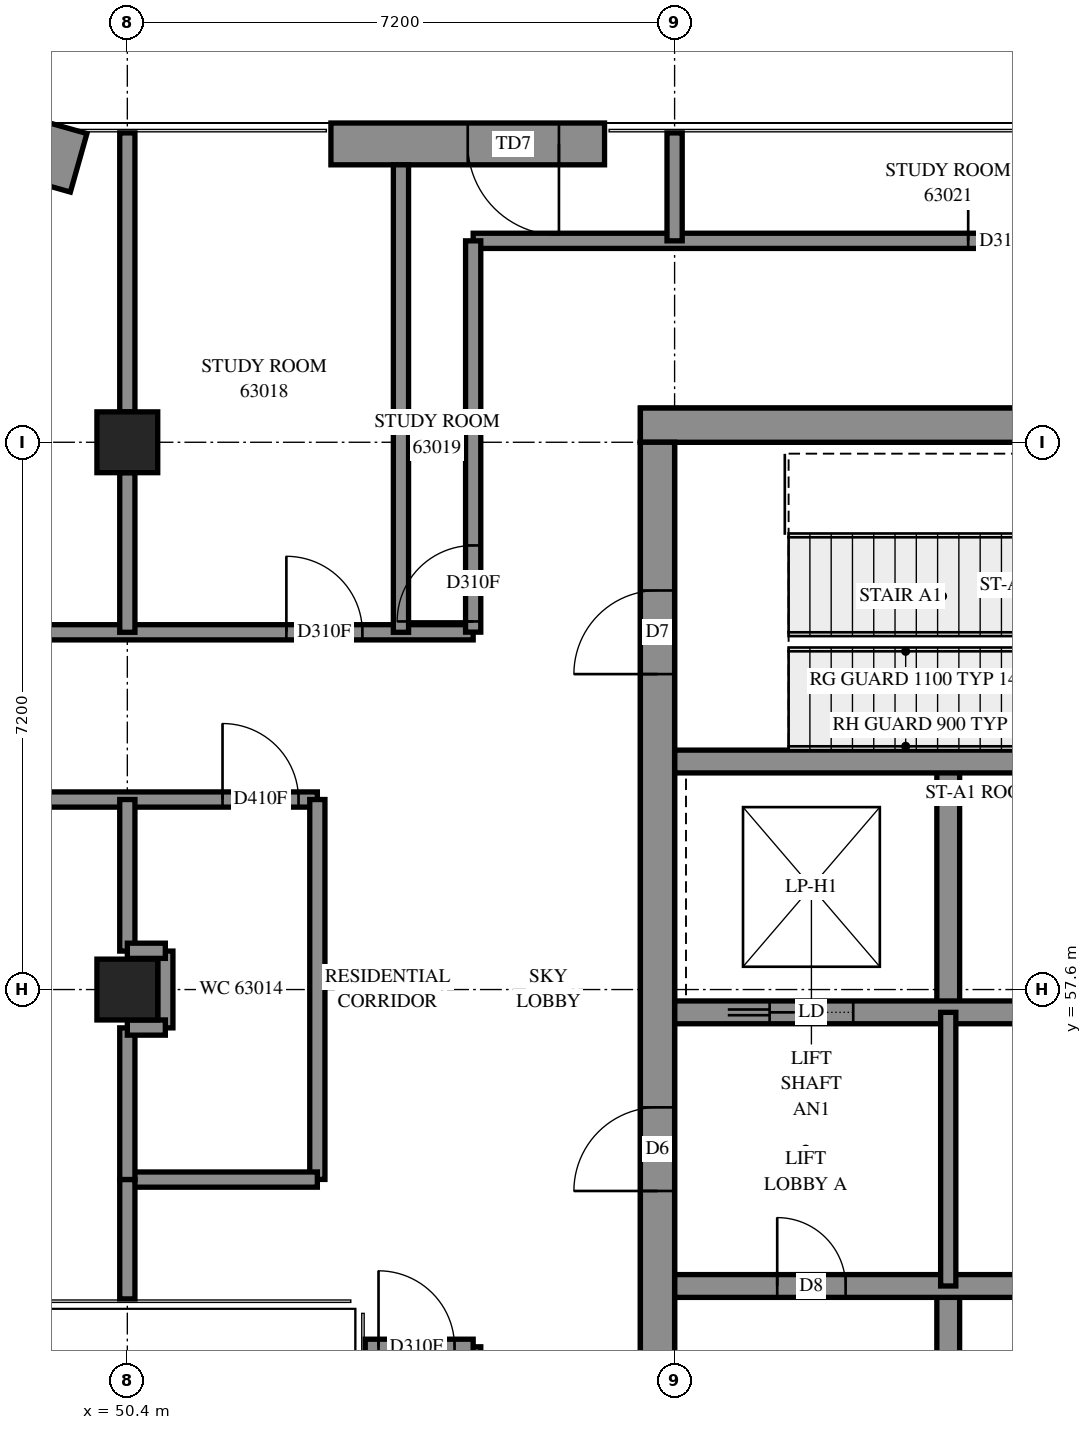
"""IFC4 building model, lengths in metres.
Left out: names, types, materials, properties, quantities, classifications, styles, units other than length and angle.
Written with IfcOpenShell. Run it as: python <this file> out.ifc"""

import sys

from ifc_helpers import new_model, si_unit, direction, frame, frame_2d, origin, origin_2d, place, context, subcontext, project, spatial, rectangle, extrude, element, fill, save


model = new_model("IFC4")
c1 = context("Model", 3, precision=1e-05, world=origin(), true_north=direction((0.0, 1.0)))
c2 = subcontext(c1, "Body", "Model", "MODEL_VIEW")
j1 = project(units=[si_unit("LENGTHUNIT", "METRE"), si_unit("PLANEANGLEUNIT", "RADIAN")], contexts=[c1])
p1 = place(None, origin())
s1 = spatial("IfcSite", under=j1, at=p1, CompositionType="ELEMENT")
p2 = place(p1, origin())
s2 = spatial("IfcBuilding", under=s1, at=p2, CompositionType="ELEMENT")
p3 = place(p2, frame((0.0, 0.0, 230.4)))
s3 = spatial("IfcBuildingStorey", under=s2, at=p3, CompositionType="ELEMENT", Elevation=230.4)
for number, where, z_axis, x_axis in (
    (1, (50.4, 57.6, 0.0), (0.0, 0.0, 1.0), (1.0, 0.0, 0.0)),
    (2, (50.4, 64.8, 0.0), (0.0, 0.0, 1.0), (1.0, 0.0, 0.0)),
):
    element("IfcColumn", number, at=place(p3, frame(where, z_axis=z_axis, x_axis=x_axis)), inside=s3, PredefinedType="COLUMN", context=c2, shape_type="SweptSolid", body=[
        extrude(rectangle(XDim=0.8, YDim=0.8, at=origin_2d()), origin(), (0.0, 0.0, 1.0), 3.9),
    ])
p4 = place(p3, frame((57.15, 65.025, -0.3), z_axis=(0.0, 0.0, 1.0), x_axis=(1.0, 0.0, 0.0)))
e3 = element("IfcWall", 3, at=p4, inside=s3, PredefinedType="SHEAR", context=c2, shape_type="SweptSolid", body=[
    extrude(rectangle(XDim=15.3, YDim=0.45, at=frame_2d((7.65, 0.0))), origin(), (0.0, 0.0, 1.0), 3.5),
])
p5 = place(p4, frame((10.45, 0.0, 0.3)))
e4 = element("IfcOpeningElement", 4, at=p5, cuts=e3, PredefinedType="OPENING", context=c2, shape_type="SweptSolid", body=[
    extrude(rectangle(XDim=0.8, YDim=2.1, at=frame_2d((0.4, 1.05))), frame((0.0, 0.235, 0.0), z_axis=(0.0, -1.0, 0.0), x_axis=(1.0, 0.0, 0.0)), (0.0, 0.0, 1.0), 0.47),
])
p6 = place(p3, frame((57.375, 50.4, -0.3), z_axis=(0.0, 0.0, 1.0), x_axis=(0.0, 1.0, 0.0)))
e5 = element("IfcWall", 5, at=p6, inside=s3, PredefinedType="SHEAR", context=c2, shape_type="SweptSolid", body=[
    extrude(rectangle(XDim=14.4, YDim=0.45, at=frame_2d((7.2, 0.0))), origin(), (0.0, 0.0, 1.0), 3.5),
])
p7 = place(p6, frame((4.55, 0.0, 0.3)))
e6 = element("IfcOpeningElement", 6, at=p7, cuts=e5, PredefinedType="OPENING", context=c2, shape_type="SweptSolid", body=[
    extrude(rectangle(XDim=1.1, YDim=2.1, at=frame_2d((0.55, 1.05))), frame((0.0, 0.235, 0.0), z_axis=(0.0, -1.0, 0.0), x_axis=(1.0, 0.0, 0.0)), (0.0, 0.0, 1.0), 0.47),
])
p8 = place(p6, frame((11.35, 0.0, 0.3)))
e7 = element("IfcOpeningElement", 7, at=p8, cuts=e5, PredefinedType="OPENING", context=c2, shape_type="SweptSolid", body=[
    extrude(rectangle(XDim=1.1, YDim=2.1, at=frame_2d((0.55, 1.05))), frame((0.0, 0.235, 0.0), z_axis=(0.0, -1.0, 0.0), x_axis=(1.0, 0.0, 0.0)), (0.0, 0.0, 1.0), 0.47),
])
for number, where, z_axis, x_axis in (
    (8, (61.2, 50.4, 0.0), (0.0, 0.0, 1.0), (0.0, 1.0, 0.0)),
    (9, (61.2, 57.3, 0.0), (0.0, 0.0, 1.0), (0.0, 1.0, 0.0)),
):
    element("IfcWall", number, at=place(p3, frame(where, z_axis=z_axis, x_axis=x_axis)), inside=s3, PredefinedType="SOLIDWALL", context=c2, shape_type="SweptSolid", body=[
        extrude(rectangle(XDim=3.3, YDim=0.3, at=frame_2d((1.65, 0.0))), origin(), (0.0, 0.0, 1.0), 3.9),
    ])
p9 = place(p3, frame((57.6, 53.7, 0.0), z_axis=(0.0, 0.0, 1.0), x_axis=(1.0, 0.0, 0.0)))
e10 = element("IfcWall", 10, at=p9, inside=s3, PredefinedType="SOLIDWALL", context=c2, shape_type="SweptSolid", body=[
    extrude(rectangle(XDim=14.4, YDim=0.3, at=frame_2d((7.2, 0.0))), origin(), (0.0, 0.0, 1.0), 3.9),
])
p10 = place(p9, frame((1.35, 0.0, 0.0)))
e11 = element("IfcOpeningElement", 11, at=p10, cuts=e10, PredefinedType="OPENING", context=c2, shape_type="SweptSolid", body=[
    extrude(rectangle(XDim=0.9, YDim=2.1, at=frame_2d((0.45, 1.05))), frame((0.0, 0.16, 0.0), z_axis=(0.0, -1.0, 0.0), x_axis=(1.0, 0.0, 0.0)), (0.0, 0.0, 1.0), 0.32),
])
p11 = place(p9, frame((4.95, 0.0, 0.0)))
e12 = element("IfcOpeningElement", 12, at=p11, cuts=e10, PredefinedType="OPENING", context=c2, shape_type="SweptSolid", body=[
    extrude(rectangle(XDim=0.9, YDim=2.1, at=frame_2d((0.45, 1.05))), frame((0.0, 0.16, 0.0), z_axis=(0.0, -1.0, 0.0), x_axis=(1.0, 0.0, 0.0)), (0.0, 0.0, 1.0), 0.32),
])
p12 = place(p9, frame((8.55, 0.0, 0.0)))
e13 = element("IfcOpeningElement", 13, at=p12, cuts=e10, PredefinedType="OPENING", context=c2, shape_type="SweptSolid", body=[
    extrude(rectangle(XDim=0.9, YDim=2.1, at=frame_2d((0.45, 1.05))), frame((0.0, 0.16, 0.0), z_axis=(0.0, -1.0, 0.0), x_axis=(1.0, 0.0, 0.0)), (0.0, 0.0, 1.0), 0.32),
])
p13 = place(p9, frame((12.05, 0.0, 0.0)))
e14 = element("IfcOpeningElement", 14, at=p13, cuts=e10, PredefinedType="OPENING", context=c2, shape_type="SweptSolid", body=[
    extrude(rectangle(XDim=1.1, YDim=2.1, at=frame_2d((0.55, 1.05))), frame((0.0, 0.16, 0.0), z_axis=(0.0, -1.0, 0.0), x_axis=(1.0, 0.0, 0.0)), (0.0, 0.0, 1.0), 0.32),
])
p14 = place(p3, frame((57.6, 57.3, 0.0), z_axis=(0.0, 0.0, 1.0), x_axis=(1.0, 0.0, 0.0)))
e15 = element("IfcWall", 15, at=p14, inside=s3, PredefinedType="SOLIDWALL", context=c2, shape_type="SweptSolid", body=[
    extrude(rectangle(XDim=14.4, YDim=0.3, at=frame_2d((7.2, 0.0))), origin(), (0.0, 0.0, 1.0), 3.9),
])
p15 = place(p14, frame((1.25, 0.0, 0.0)))
e16 = element("IfcOpeningElement", 16, at=p15, cuts=e15, PredefinedType="OPENING", context=c2, shape_type="SweptSolid", body=[
    extrude(rectangle(XDim=1.1, YDim=2.1, at=frame_2d((0.55, 1.05))), frame((0.0, 0.16, 0.0), z_axis=(0.0, -1.0, 0.0), x_axis=(1.0, 0.0, 0.0)), (0.0, 0.0, 1.0), 0.32),
])
p16 = place(p14, frame((4.85, 0.0, 0.0)))
e17 = element("IfcOpeningElement", 17, at=p16, cuts=e15, PredefinedType="OPENING", context=c2, shape_type="SweptSolid", body=[
    extrude(rectangle(XDim=1.1, YDim=2.1, at=frame_2d((0.55, 1.05))), frame((0.0, 0.16, 0.0), z_axis=(0.0, -1.0, 0.0), x_axis=(1.0, 0.0, 0.0)), (0.0, 0.0, 1.0), 0.32),
])
p17 = place(p14, frame((8.45, 0.0, 0.0)))
e18 = element("IfcOpeningElement", 18, at=p17, cuts=e15, PredefinedType="OPENING", context=c2, shape_type="SweptSolid", body=[
    extrude(rectangle(XDim=1.1, YDim=2.1, at=frame_2d((0.55, 1.05))), frame((0.0, 0.16, 0.0), z_axis=(0.0, -1.0, 0.0), x_axis=(1.0, 0.0, 0.0)), (0.0, 0.0, 1.0), 0.32),
])
p18 = place(p14, frame((12.05, 0.0, 0.0)))
e19 = element("IfcOpeningElement", 19, at=p18, cuts=e15, PredefinedType="OPENING", context=c2, shape_type="SweptSolid", body=[
    extrude(rectangle(XDim=1.1, YDim=2.1, at=frame_2d((0.55, 1.05))), frame((0.0, 0.16, 0.0), z_axis=(0.0, -1.0, 0.0), x_axis=(1.0, 0.0, 0.0)), (0.0, 0.0, 1.0), 0.32),
])
p19 = place(p3, frame((57.6, 60.6, 0.0), z_axis=(0.0, 0.0, 1.0), x_axis=(1.0, 0.0, 0.0)))
e20 = element("IfcWall", 20, at=p19, inside=s3, PredefinedType="SOLIDWALL", context=c2, shape_type="SweptSolid", body=[
    extrude(rectangle(XDim=7.2, YDim=0.3, at=frame_2d((3.6, 0.0))), origin(), (0.0, 0.0, 1.0), 3.9),
])
p20 = place(p3, frame((56.678, 68.725, 0.0), z_axis=(0.0, 0.0, 1.0), x_axis=(-1.0, 0.0, 0.0)))
e21 = element("IfcWall", 21, at=p20, inside=s3, PredefinedType="SOLIDWALL", context=c2, shape_type="SweptSolid", body=[
    extrude(rectangle(XDim=3.6, YDim=0.55, at=frame_2d((1.8, 0.0))), origin(), (0.0, 0.0, 1.0), 3.9),
])
p21 = place(p20, frame((0.6, 0.0, 0.0)))
e22 = element("IfcOpeningElement", 22, at=p21, cuts=e21, PredefinedType="OPENING", context=c2, shape_type="SweptSolid", body=[
    extrude(rectangle(XDim=1.2, YDim=2.4, at=frame_2d((0.6, 1.2))), frame((0.0, 0.285, 0.0), z_axis=(0.0, -1.0, 0.0), x_axis=(1.0, 0.0, 0.0)), (0.0, 0.0, 1.0), 0.57),
])
p22 = place(p3, frame((49.76, 68.477, 0.0), z_axis=(0.0, 0.0, 1.0), x_axis=(-0.9622632511, 0.2721202593, 0.0)))
e23 = element("IfcWall", 23, at=p22, inside=s3, PredefinedType="SOLIDWALL", context=c2, shape_type="SweptSolid", body=[
    extrude(rectangle(XDim=5.598, YDim=0.8, at=frame_2d((2.799, 0.0))), origin(), (0.0, 0.0, 1.0), 0.65),
])
p23 = place(p3, frame((61.2, 53.7, 0.0), z_axis=(0.0, 0.0, 1.0), x_axis=(0.0, 1.0, 0.0)))
e24 = element("IfcWall", 24, at=p23, inside=s3, PredefinedType="PARTITIONING", context=c2, shape_type="SweptSolid", body=[
    extrude(rectangle(XDim=3.6, YDim=0.2, at=frame_2d((1.8, 0.0))), origin(), (0.0, 0.0, 1.0), 3.9),
])
p24 = place(p3, frame((54.95, 67.45, 0.0), z_axis=(0.0, 0.0, 1.0), x_axis=(1.0, 0.0, 0.0)))
e25 = element("IfcWall", 25, at=p24, inside=s3, PredefinedType="PARTITIONING", context=c2, shape_type="SweptSolid", body=[
    extrude(rectangle(XDim=19.7, YDim=0.2, at=frame_2d((9.85, 0.0))), origin(), (0.0, 0.0, 1.0), 3.9),
])
p25 = place(p24, frame((6.513, 0.0, 0.0)))
e26 = element("IfcOpeningElement", 26, at=p25, cuts=e25, PredefinedType="OPENING", context=c2, shape_type="SweptSolid", body=[
    extrude(rectangle(XDim=1.0, YDim=2.1, at=frame_2d((0.5, 1.05))), frame((0.0, 0.11, 0.0), z_axis=(0.0, -1.0, 0.0), x_axis=(1.0, 0.0, 0.0)), (0.0, 0.0, 1.0), 0.22),
])
p26 = place(p24, frame((13.713, 0.0, 0.0)))
e27 = element("IfcOpeningElement", 27, at=p26, cuts=e25, PredefinedType="OPENING", context=c2, shape_type="SweptSolid", body=[
    extrude(rectangle(XDim=1.0, YDim=2.1, at=frame_2d((0.5, 1.05))), frame((0.0, 0.11, 0.0), z_axis=(0.0, -1.0, 0.0), x_axis=(1.0, 0.0, 0.0)), (0.0, 0.0, 1.0), 0.22),
])
p27 = place(p3, frame((40.702, 62.3, 0.0), z_axis=(0.0, 0.0, 1.0), x_axis=(1.0, 0.0, 0.0)))
e28 = element("IfcWall", 28, at=p27, inside=s3, PredefinedType="PARTITIONING", context=c2, shape_type="SweptSolid", body=[
    extrude(rectangle(XDim=14.248, YDim=0.2, at=frame_2d((7.124, 0.0))), origin(), (0.0, 0.0, 1.0), 3.9),
])
p28 = place(p27, frame((6.361, 0.0, 0.0)))
e29 = element("IfcOpeningElement", 29, at=p28, cuts=e28, PredefinedType="OPENING", context=c2, shape_type="SweptSolid", body=[
    extrude(rectangle(XDim=1.0, YDim=2.1, at=frame_2d((0.5, 1.05))), frame((0.0, 0.11, 0.0), z_axis=(0.0, -1.0, 0.0), x_axis=(1.0, 0.0, 0.0)), (0.0, 0.0, 1.0), 0.22),
])
p29 = place(p27, frame((11.79, 0.0, 0.0)))
e30 = element("IfcOpeningElement", 30, at=p29, cuts=e28, PredefinedType="OPENING", context=c2, shape_type="SweptSolid", body=[
    extrude(rectangle(XDim=1.0, YDim=2.1, at=frame_2d((0.5, 1.05))), frame((0.0, 0.11, 0.0), z_axis=(0.0, -1.0, 0.0), x_axis=(1.0, 0.0, 0.0)), (0.0, 0.0, 1.0), 0.22),
])
p30 = place(p3, frame((54.0, 62.3, 0.0), z_axis=(0.0, 0.0, 1.0), x_axis=(0.0, 1.0, 0.0)))
e31 = element("IfcWall", 31, at=p30, inside=s3, PredefinedType="PARTITIONING", context=c2, shape_type="SweptSolid", body=[
    extrude(rectangle(XDim=6.15, YDim=0.2, at=frame_2d((3.075, 0.0))), origin(), (0.0, 0.0, 1.0), 3.9),
])
p31 = place(p3, frame((46.33, 60.1, 0.0), z_axis=(0.0, 0.0, 1.0), x_axis=(1.0, 0.0, 0.0)))
e32 = element("IfcWall", 32, at=p31, inside=s3, PredefinedType="PARTITIONING", context=c2, shape_type="SweptSolid", body=[
    extrude(rectangle(XDim=6.57, YDim=0.2, at=frame_2d((3.285, 0.0))), origin(), (0.0, 0.0, 1.0), 3.9),
])
p32 = place(p31, frame((0.924, 0.0, 0.0)))
e33 = element("IfcOpeningElement", 33, at=p32, cuts=e32, PredefinedType="OPENING", context=c2, shape_type="SweptSolid", body=[
    extrude(rectangle(XDim=1.0, YDim=2.1, at=frame_2d((0.5, 1.05))), frame((0.0, 0.11, 0.0), z_axis=(0.0, -1.0, 0.0), x_axis=(1.0, 0.0, 0.0)), (0.0, 0.0, 1.0), 0.22),
])
p33 = place(p31, frame((5.322, 0.0, 0.0)))
e34 = element("IfcOpeningElement", 34, at=p33, cuts=e32, PredefinedType="OPENING", context=c2, shape_type="SweptSolid", body=[
    extrude(rectangle(XDim=1.0, YDim=2.1, at=frame_2d((0.5, 1.05))), frame((0.0, 0.11, 0.0), z_axis=(0.0, -1.0, 0.0), x_axis=(1.0, 0.0, 0.0)), (0.0, 0.0, 1.0), 0.22),
])
p34 = place(p3, frame((54.95, 47.75, 0.0), z_axis=(0.0, 0.0, 1.0), x_axis=(0.0, 1.0, 0.0)))
e35 = element("IfcWall", 35, at=p34, inside=s3, PredefinedType="PARTITIONING", context=c2, shape_type="SweptSolid", body=[
    extrude(rectangle(XDim=5.15, YDim=0.2, at=frame_2d((2.575, 0.0))), origin(), (0.0, 0.0, 1.0), 3.9),
])
p35 = place(p3, frame((54.95, 62.302, 0.0), z_axis=(0.0, 0.0, 1.0), x_axis=(0.0, 1.0, 0.0)))
e36 = element("IfcWall", 36, at=p35, inside=s3, PredefinedType="PARTITIONING", context=c2, shape_type="SweptSolid", body=[
    extrude(rectangle(XDim=5.148, YDim=0.2, at=frame_2d((2.574, 0.0))), origin(), (0.0, 0.0, 1.0), 3.9),
])
p36 = place(p35, frame((0.141, 0.0, 0.0)))
e37 = element("IfcOpeningElement", 37, at=p36, cuts=e36, PredefinedType="OPENING", context=c2, shape_type="SweptSolid", body=[
    extrude(rectangle(XDim=1.0, YDim=2.1, at=frame_2d((0.5, 1.05))), frame((0.0, 0.11, 0.0), z_axis=(0.0, -1.0, 0.0), x_axis=(1.0, 0.0, 0.0)), (0.0, 0.0, 1.0), 0.22),
])
p37 = place(p3, frame((52.9, 55.102, 0.0), z_axis=(0.0, 0.0, 1.0), x_axis=(0.0, 1.0, 0.0)))
e38 = element("IfcWall", 38, at=p37, inside=s3, PredefinedType="PARTITIONING", context=c2, shape_type="SweptSolid", body=[
    extrude(rectangle(XDim=4.998, YDim=0.2, at=frame_2d((2.499, 0.0))), origin(), (0.0, 0.0, 1.0), 3.9),
])
p38 = place(p3, frame((50.4, 65.2, 0.0), z_axis=(0.0, 0.0, 1.0), x_axis=(0.0, 1.0, 0.0)))
e39 = element("IfcWall", 39, at=p38, inside=s3, PredefinedType="PARTITIONING", context=c2, shape_type="SweptSolid", body=[
    extrude(rectangle(XDim=3.67, YDim=0.2, at=frame_2d((1.835, 0.0))), origin(), (0.0, 0.0, 1.0), 3.9),
])
p39 = place(p3, frame((50.4, 55.1, 0.0), z_axis=(0.0, 0.0, 1.0), x_axis=(1.0, 0.0, 0.0)))
e40 = element("IfcWall", 40, at=p39, inside=s3, PredefinedType="PARTITIONING", context=c2, shape_type="SweptSolid", body=[
    extrude(rectangle(XDim=2.5, YDim=0.2, at=frame_2d((1.25, 0.0))), origin(), (0.0, 0.0, 1.0), 3.9),
])
p40 = place(p3, frame((50.4, 62.3, 0.0), z_axis=(0.0, 0.0, 1.0), x_axis=(0.0, 1.0, 0.0)))
e41 = element("IfcWall", 41, at=p40, inside=s3, PredefinedType="PARTITIONING", context=c2, shape_type="SweptSolid", body=[
    extrude(rectangle(XDim=2.1, YDim=0.2, at=frame_2d((1.05, 0.0))), origin(), (0.0, 0.0, 1.0), 3.9),
])
p41 = place(p3, frame((50.4, 55.1, 0.0), z_axis=(0.0, 0.0, 1.0), x_axis=(0.0, 1.0, 0.0)))
e42 = element("IfcWall", 42, at=p41, inside=s3, PredefinedType="PARTITIONING", context=c2, shape_type="SweptSolid", body=[
    extrude(rectangle(XDim=1.996, YDim=0.2, at=frame_2d((0.998, 0.0))), origin(), (0.0, 0.0, 1.0), 3.9),
])
p42 = place(p3, frame((50.4, 58.106, 0.0), z_axis=(0.0, 0.0, 1.0), x_axis=(0.0, 1.0, 0.0)))
e43 = element("IfcWall", 43, at=p42, inside=s3, PredefinedType="PARTITIONING", context=c2, shape_type="SweptSolid", body=[
    extrude(rectangle(XDim=1.994, YDim=0.2, at=frame_2d((0.997, 0.0))), origin(), (0.0, 0.0, 1.0), 3.9),
])
p43 = place(p3, frame((50.4, 53.53, 0.0), z_axis=(0.0, 0.0, 1.0), x_axis=(0.0, 1.0, 0.0)))
e44 = element("IfcWall", 44, at=p43, inside=s3, PredefinedType="PARTITIONING", context=c2, shape_type="SweptSolid", body=[
    extrude(rectangle(XDim=1.57, YDim=0.2, at=frame_2d((0.785, 0.0))), origin(), (0.0, 0.0, 1.0), 3.9),
])
p44 = place(p3, frame((53.53, 52.9, 0.0), z_axis=(0.0, 0.0, 1.0), x_axis=(1.0, 0.0, 0.0)))
e45 = element("IfcWall", 45, at=p44, inside=s3, PredefinedType="PARTITIONING", context=c2, shape_type="SweptSolid", body=[
    extrude(rectangle(XDim=1.42, YDim=0.2, at=frame_2d((0.71, 0.0))), origin(), (0.0, 0.0, 1.0), 3.9),
])
p45 = place(p44, frame((0.175, 0.0, 0.0)))
e46 = element("IfcOpeningElement", 46, at=p45, cuts=e45, PredefinedType="OPENING", context=c2, shape_type="SweptSolid", body=[
    extrude(rectangle(XDim=1.0, YDim=2.1, at=frame_2d((0.5, 1.05))), frame((0.0, 0.11, 0.0), z_axis=(0.0, -1.0, 0.0), x_axis=(1.0, 0.0, 0.0)), (0.0, 0.0, 1.0), 0.22),
])
p46 = place(p3, frame((57.6, 67.45, 0.0), z_axis=(0.0, 0.0, 1.0), x_axis=(0.0, 1.0, 0.0)))
e47 = element("IfcWall", 47, at=p46, inside=s3, PredefinedType="PARTITIONING", context=c2, shape_type="SweptSolid", body=[
    extrude(rectangle(XDim=1.42, YDim=0.2, at=frame_2d((0.71, 0.0))), origin(), (0.0, 0.0, 1.0), 3.9),
])
p47 = place(p3, frame((50.9, 57.096, 0.0), z_axis=(0.0, 0.0, 1.0), x_axis=(0.0, 1.0, 0.0)))
e48 = element("IfcWall", 48, at=p47, inside=s3, PredefinedType="PARTITIONING", context=c2, shape_type="SweptSolid", body=[
    extrude(rectangle(XDim=1.01, YDim=0.2, at=frame_2d((0.505, 0.0))), origin(), (0.0, 0.0, 1.0), 3.9),
])
for number, where, z_axis, x_axis in (
    (49, (50.4, 58.11, 0.0), (0.0, 0.0, 1.0), (1.0, 0.0, 0.0)),
    (50, (50.4, 57.1, 0.0), (0.0, 0.0, 1.0), (1.0, 0.0, 0.0)),
):
    element("IfcWall", number, at=place(p3, frame(where, z_axis=z_axis, x_axis=x_axis)), inside=s3, PredefinedType="PARTITIONING", context=c2, shape_type="SweptSolid", body=[
        extrude(rectangle(XDim=0.5, YDim=0.2, at=frame_2d((0.25, 0.0))), origin(), (0.0, 0.0, 1.0), 3.9),
    ])
p48 = place(p21, origin())
e51 = element("IfcDoor", 51, at=p48, inside=s3, OperationType="SINGLE_SWING_LEFT", PredefinedType="DOOR", context=c2, shape_type="SweptSolid", body=[
    extrude(rectangle(XDim=1.2, YDim=2.4, at=frame_2d((0.6, 1.2))), frame((0.0, 0.025, 0.0), z_axis=(0.0, -1.0, 0.0), x_axis=(1.0, 0.0, 0.0)), (0.0, 0.0, 1.0), 0.05),
])
fill(e22, e51)
p49 = place(p7, origin())
e52 = element("IfcDoor", 52, at=p49, inside=s3, OperationType="DOUBLE_DOOR_SINGLE_SWING", PredefinedType="DOOR", context=c2, shape_type="SweptSolid", body=[
    extrude(rectangle(XDim=1.1, YDim=2.1, at=frame_2d((0.55, 1.05))), frame((0.0, 0.025, 0.0), z_axis=(0.0, -1.0, 0.0), x_axis=(1.0, 0.0, 0.0)), (0.0, 0.0, 1.0), 0.05),
])
fill(e6, e52)
p50 = place(p8, origin())
e53 = element("IfcDoor", 53, at=p50, inside=s3, OperationType="SINGLE_SWING_LEFT", PredefinedType="DOOR", context=c2, shape_type="SweptSolid", body=[
    extrude(rectangle(XDim=1.1, YDim=2.1, at=frame_2d((0.55, 1.05))), frame((0.0, 0.025, 0.0), z_axis=(0.0, -1.0, 0.0), x_axis=(1.0, 0.0, 0.0)), (0.0, 0.0, 1.0), 0.05),
])
fill(e7, e53)
p51 = place(p10, origin())
e54 = element("IfcDoor", 54, at=p51, inside=s3, OperationType="SINGLE_SWING_LEFT", PredefinedType="DOOR", context=c2, shape_type="SweptSolid", body=[
    extrude(rectangle(XDim=0.9, YDim=2.1, at=frame_2d((0.45, 1.05))), frame((0.0, 0.025, 0.0), z_axis=(0.0, -1.0, 0.0), x_axis=(1.0, 0.0, 0.0)), (0.0, 0.0, 1.0), 0.05),
])
fill(e11, e54)
p52 = place(p15, origin())
e55 = element("IfcDoor", 55, at=p52, inside=s3, OperationType="SLIDING_TO_LEFT", PredefinedType="DOOR", context=c2, shape_type="SweptSolid", body=[
    extrude(rectangle(XDim=1.1, YDim=2.1, at=frame_2d((0.55, 1.05))), frame((0.0, 0.025, 0.0), z_axis=(0.0, -1.0, 0.0), x_axis=(1.0, 0.0, 0.0)), (0.0, 0.0, 1.0), 0.05),
])
fill(e16, e55)
p53 = place(p45, origin())
e56 = element("IfcDoor", 56, at=p53, inside=s3, OperationType="SINGLE_SWING_RIGHT", PredefinedType="DOOR", context=c2, shape_type="SweptSolid", body=[
    extrude(rectangle(XDim=1.0, YDim=2.1, at=frame_2d((0.5, 1.05))), frame((0.0, 0.025, 0.0), z_axis=(0.0, -1.0, 0.0), x_axis=(1.0, 0.0, 0.0)), (0.0, 0.0, 1.0), 0.05),
])
fill(e46, e56)
p54 = place(p33, origin())
e57 = element("IfcDoor", 57, at=p54, inside=s3, OperationType="SINGLE_SWING_LEFT", PredefinedType="DOOR", context=c2, shape_type="SweptSolid", body=[
    extrude(rectangle(XDim=1.0, YDim=2.1, at=frame_2d((0.5, 1.05))), frame((0.0, 0.025, 0.0), z_axis=(0.0, -1.0, 0.0), x_axis=(1.0, 0.0, 0.0)), (0.0, 0.0, 1.0), 0.05),
])
fill(e34, e57)
p55 = place(p29, origin())
e58 = element("IfcDoor", 58, at=p55, inside=s3, OperationType="SINGLE_SWING_RIGHT", PredefinedType="DOOR", context=c2, shape_type="SweptSolid", body=[
    extrude(rectangle(XDim=1.0, YDim=2.1, at=frame_2d((0.5, 1.05))), frame((0.0, 0.025, 0.0), z_axis=(0.0, -1.0, 0.0), x_axis=(1.0, 0.0, 0.0)), (0.0, 0.0, 1.0), 0.05),
])
fill(e30, e58)
p56 = place(p36, origin())
e59 = element("IfcDoor", 59, at=p56, inside=s3, OperationType="SINGLE_SWING_LEFT", PredefinedType="DOOR", context=c2, shape_type="SweptSolid", body=[
    extrude(rectangle(XDim=1.0, YDim=2.1, at=frame_2d((0.5, 1.05))), frame((0.0, 0.025, 0.0), z_axis=(0.0, -1.0, 0.0), x_axis=(1.0, 0.0, 0.0)), (0.0, 0.0, 1.0), 0.05),
])
fill(e37, e59)
p57 = place(p25, origin())
e60 = element("IfcDoor", 60, at=p57, inside=s3, OperationType="SINGLE_SWING_RIGHT", PredefinedType="DOOR", context=c2, shape_type="SweptSolid", body=[
    extrude(rectangle(XDim=1.0, YDim=2.1, at=frame_2d((0.5, 1.05))), frame((0.0, 0.025, 0.0), z_axis=(0.0, -1.0, 0.0), x_axis=(1.0, 0.0, 0.0)), (0.0, 0.0, 1.0), 0.05),
])
fill(e26, e60)
save(model, sys.argv[1])
